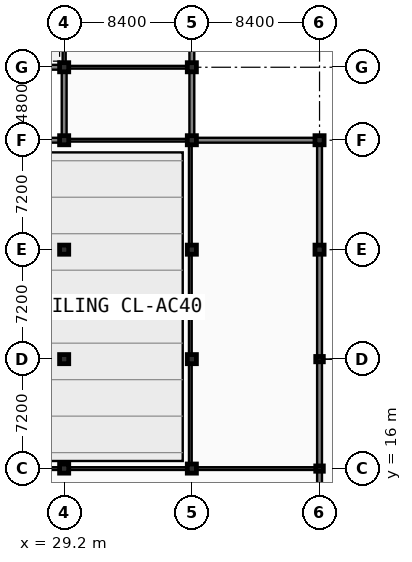
"""IFC4 building model, lengths in metres.
Left out: names, types, materials, properties, quantities, classifications, styles, units other than length and angle.
Written with IfcOpenShell. Run it as: python <this file> out.ifc"""

import sys

from ifc_helpers import new_model, si_unit, direction, frame, frame_2d, origin, origin_2d, place, context, subcontext, project, spatial, rectangle, extrude, element, fill, save


model = new_model("IFC4")
c1 = context("Model", 3, precision=1e-05, world=origin(), true_north=direction((0.0, 1.0)))
c2 = subcontext(c1, "Body", "Model", "MODEL_VIEW")
j1 = project(units=[si_unit("LENGTHUNIT", "METRE"), si_unit("PLANEANGLEUNIT", "RADIAN")], contexts=[c1])
p1 = place(None, origin())
s1 = spatial("IfcSite", under=j1, at=p1, CompositionType="ELEMENT")
p2 = place(p1, origin())
s2 = spatial("IfcBuilding", under=s1, at=p2, CompositionType="ELEMENT")
p3 = place(p2, origin())
s3 = spatial("IfcBuildingStorey", under=s2, at=p3, CompositionType="ELEMENT", Elevation=0.0)
for number, where, z_axis, x_axis in (
    (1, (29.2, 16.0, 0.0), (0.0, 0.0, 1.0), (1.0, 0.0, 0.0)),
    (2, (29.2, 23.2, 0.0), (0.0, 0.0, 1.0), (1.0, 0.0, 0.0)),
    (3, (29.2, 30.4, 0.0), (0.0, 0.0, 1.0), (1.0, 0.0, 0.0)),
    (4, (29.2, 37.6, 0.0), (0.0, 0.0, 1.0), (1.0, 0.0, 0.0)),
    (5, (29.2, 42.4, 0.0), (0.0, 0.0, 1.0), (1.0, 0.0, 0.0)),
    (6, (37.6, 16.0, 0.0), (0.0, 0.0, 1.0), (1.0, 0.0, 0.0)),
    (7, (37.6, 23.2, 0.0), (0.0, 0.0, 1.0), (1.0, 0.0, 0.0)),
    (8, (37.6, 30.4, 0.0), (0.0, 0.0, 1.0), (1.0, 0.0, 0.0)),
    (9, (37.6, 37.6, 0.0), (0.0, 0.0, 1.0), (1.0, 0.0, 0.0)),
    (10, (37.6, 42.4, 0.0), (0.0, 0.0, 1.0), (1.0, 0.0, 0.0)),
):
    element("IfcColumn", number, at=place(p3, frame(where, z_axis=z_axis, x_axis=x_axis)), inside=s3, PredefinedType="COLUMN", context=c2, shape_type="SweptSolid", body=[
        extrude(rectangle(XDim=0.6, YDim=0.6, at=origin_2d()), origin(), (0.0, 0.0, 1.0), 5.4),
    ])
for number, where, z_axis, x_axis in (
    (11, (46.0, 16.0, 0.0), (0.0, 0.0, 1.0), (1.0, 0.0, 0.0)),
    (12, (46.0, 23.2, 0.0), (0.0, 0.0, 1.0), (1.0, 0.0, 0.0)),
):
    element("IfcColumn", number, at=place(p3, frame(where, z_axis=z_axis, x_axis=x_axis)), inside=s3, PredefinedType="PILASTER", context=c2, shape_type="SweptSolid", body=[
        extrude(rectangle(XDim=0.5, YDim=0.35, at=origin_2d()), origin(), (0.0, 0.0, 1.0), 5.4),
    ])
for number, where, z_axis, x_axis in (
    (13, (46.0, 30.4, 0.0), (0.0, 0.0, 1.0), (1.0, 0.0, 0.0)),
    (14, (46.0, 37.6, 0.0), (0.0, 0.0, 1.0), (1.0, 0.0, 0.0)),
):
    element("IfcColumn", number, at=place(p3, frame(where, z_axis=z_axis, x_axis=x_axis)), inside=s3, PredefinedType="COLUMN", context=c2, shape_type="SweptSolid", body=[
        extrude(rectangle(XDim=0.6, YDim=0.6, at=origin_2d()), origin(), (0.0, 0.0, 1.0), 5.4),
    ])
p4 = place(p3, frame((12.4, 16.0, 0.0), z_axis=(0.0, 0.0, 1.0), x_axis=(1.0, 0.0, 0.0)))
e15 = element("IfcWall", 15, at=p4, inside=s3, PredefinedType="PARTITIONING", context=c2, shape_type="SweptSolid", body=[
    extrude(rectangle(XDim=33.45, YDim=0.18, at=frame_2d((16.725, 0.0))), origin(), (0.0, 0.0, 1.0), 3.99),
])
p5 = place(p4, frame((11.147, 0.0, -0.01)))
e16 = element("IfcOpeningElement", 16, at=p5, cuts=e15, PredefinedType="OPENING", context=c2, shape_type="SweptSolid", body=[
    extrude(rectangle(XDim=1.6, YDim=2.21, at=frame_2d((0.8, 1.105))), frame((0.0, 0.1, 0.0), z_axis=(0.0, -1.0, 0.0), x_axis=(1.0, 0.0, 0.0)), (0.0, 0.0, 1.0), 0.2),
])
p6 = place(p3, frame((37.5, 16.0, 0.0), z_axis=(0.0, 0.0, 1.0), x_axis=(0.0, 1.0, 0.0)))
e17 = element("IfcWall", 17, at=p6, inside=s3, PredefinedType="PARTITIONING", context=c2, shape_type="SweptSolid", body=[
    extrude(rectangle(XDim=21.75, YDim=0.18, at=frame_2d((10.875, 0.0))), origin(), (0.0, 0.0, 1.0), 4.54),
])
p7 = place(p6, frame((10.075, 0.0, -0.01)))
e18 = element("IfcOpeningElement", 18, at=p7, cuts=e17, PredefinedType="OPENING", context=c2, shape_type="SweptSolid", body=[
    extrude(rectangle(XDim=1.6, YDim=2.21, at=frame_2d((0.8, 1.105))), frame((0.0, 0.1, 0.0), z_axis=(0.0, -1.0, 0.0), x_axis=(1.0, 0.0, 0.0)), (0.0, 0.0, 1.0), 0.2),
])
p8 = place(p3, frame((29.35, 37.6, 0.0), z_axis=(0.0, 0.0, 1.0), x_axis=(1.0, 0.0, 0.0)))
e19 = element("IfcWall", 19, at=p8, inside=s3, PredefinedType="PARTITIONING", context=c2, shape_type="SweptSolid", body=[
    extrude(rectangle(XDim=8.1, YDim=0.18, at=frame_2d((4.05, 0.0))), origin(), (0.0, 0.0, 1.0), 4.64),
])
p9 = place(p8, frame((3.15, 0.0, -0.01)))
e20 = element("IfcOpeningElement", 20, at=p9, cuts=e19, PredefinedType="OPENING", context=c2, shape_type="SweptSolid", body=[
    extrude(rectangle(XDim=1.8, YDim=2.26, at=frame_2d((0.9, 1.13))), frame((0.0, 0.1, 0.0), z_axis=(0.0, -1.0, 0.0), x_axis=(1.0, 0.0, 0.0)), (0.0, 0.0, 1.0), 0.2),
])
p10 = place(p3, frame((29.35, 42.4, 0.0), z_axis=(0.0, 0.0, 1.0), x_axis=(1.0, 0.0, 0.0)))
e21 = element("IfcWall", 21, at=p10, inside=s3, PredefinedType="PARTITIONING", context=c2, shape_type="SweptSolid", body=[
    extrude(rectangle(XDim=8.1, YDim=0.18, at=frame_2d((4.05, 0.0))), origin(), (0.0, 0.0, 1.0), 4.64),
])
p11 = place(p10, frame((2.205, 0.0, -0.01)))
e22 = element("IfcOpeningElement", 22, at=p11, cuts=e21, PredefinedType="OPENING", context=c2, shape_type="SweptSolid", body=[
    extrude(rectangle(XDim=1.8, YDim=2.26, at=frame_2d((0.9, 1.13))), frame((0.0, 0.1, 0.0), z_axis=(0.0, -1.0, 0.0), x_axis=(1.0, 0.0, 0.0)), (0.0, 0.0, 1.0), 0.2),
])
p12 = place(p3, frame((29.2, 42.25, 0.0), z_axis=(0.0, 0.0, 1.0), x_axis=(0.0, 1.0, 0.0)))
e23 = element("IfcWall", 23, at=p12, inside=s3, PredefinedType="PARTITIONING", context=c2, shape_type="SweptSolid", body=[
    extrude(rectangle(XDim=33.6, YDim=0.2, at=frame_2d((16.8, 0.0))), origin(), (0.0, 0.0, 1.0), 4.54),
])
p13 = place(p12, frame((14.31, 0.0, -0.01)))
e24 = element("IfcOpeningElement", 24, at=p13, cuts=e23, PredefinedType="OPENING", context=c2, shape_type="SweptSolid", body=[
    extrude(rectangle(XDim=1.8, YDim=2.26, at=frame_2d((0.9, 1.13))), frame((0.0, 0.11, 0.0), z_axis=(0.0, -1.0, 0.0), x_axis=(1.0, 0.0, 0.0)), (0.0, 0.0, 1.0), 0.22),
])
p14 = place(p3, frame((29.2, 37.6, 0.0), z_axis=(0.0, 0.0, 1.0), x_axis=(-1.0, 0.0, 0.0)))
e25 = element("IfcWall", 25, at=p14, inside=s3, PredefinedType="SOLIDWALL", context=c2, shape_type="SweptSolid", body=[
    extrude(rectangle(XDim=8.4, YDim=0.32, at=frame_2d((4.2, 0.0))), origin(), (0.0, 0.0, 1.0), 4.64),
])
p15 = place(p14, frame((3.2, 0.0, -0.01)))
e26 = element("IfcOpeningElement", 26, at=p15, cuts=e25, PredefinedType="OPENING", context=c2, shape_type="SweptSolid", body=[
    extrude(rectangle(XDim=2.0, YDim=2.41, at=frame_2d((1.0, 1.205))), frame((0.0, 0.17, 0.0), z_axis=(0.0, -1.0, 0.0), x_axis=(1.0, 0.0, 0.0)), (0.0, 0.0, 1.0), 0.34),
])
p16 = place(p3, frame((46.0, 37.6, 0.0), z_axis=(0.0, 0.0, 1.0), x_axis=(-1.0, 0.0, 0.0)))
e27 = element("IfcWall", 27, at=p16, inside=s3, PredefinedType="SOLIDWALL", context=c2, shape_type="SweptSolid", body=[
    extrude(rectangle(XDim=8.4, YDim=0.32, at=frame_2d((4.2, 0.0))), origin(), (0.0, 0.0, 1.0), 4.64),
])
p17 = place(p16, frame((0.46, 0.0, 0.9)))
e28 = element("IfcOpeningElement", 28, at=p17, cuts=e27, PredefinedType="OPENING", context=c2, shape_type="SweptSolid", body=[
    extrude(rectangle(XDim=2.4, YDim=2.35, at=frame_2d((1.2, 1.175))), frame((0.0, 0.17, 0.0), z_axis=(0.0, -1.0, 0.0), x_axis=(1.0, 0.0, 0.0)), (0.0, 0.0, 1.0), 0.34),
])
p18 = place(p16, frame((5.46, 0.0, 0.9)))
e29 = element("IfcOpeningElement", 29, at=p18, cuts=e27, PredefinedType="OPENING", context=c2, shape_type="SweptSolid", body=[
    extrude(rectangle(XDim=2.4, YDim=2.35, at=frame_2d((1.2, 1.175))), frame((0.0, 0.17, 0.0), z_axis=(0.0, -1.0, 0.0), x_axis=(1.0, 0.0, 0.0)), (0.0, 0.0, 1.0), 0.34),
])
p19 = place(p3, frame((46.0, 8.8, 0.0), z_axis=(0.0, 0.0, 1.0), x_axis=(0.0, 1.0, 0.0)))
e30 = element("IfcWall", 30, at=p19, inside=s3, PredefinedType="SOLIDWALL", context=c2, shape_type="SweptSolid", body=[
    extrude(rectangle(XDim=7.2, YDim=0.32, at=frame_2d((3.6, 0.0))), origin(), (0.0, 0.0, 1.0), 3.99),
])
p20 = place(p19, frame((2.6, 0.0, -0.01)))
e31 = element("IfcOpeningElement", 31, at=p20, cuts=e30, PredefinedType="OPENING", context=c2, shape_type="SweptSolid", body=[
    extrude(rectangle(XDim=2.0, YDim=2.41, at=frame_2d((1.0, 1.205))), frame((0.0, 0.17, 0.0), z_axis=(0.0, -1.0, 0.0), x_axis=(1.0, 0.0, 0.0)), (0.0, 0.0, 1.0), 0.34),
])
p21 = place(p3, frame((46.0, 16.0, 0.0), z_axis=(0.0, 0.0, 1.0), x_axis=(0.0, 1.0, 0.0)))
e32 = element("IfcWall", 32, at=p21, inside=s3, PredefinedType="SOLIDWALL", context=c2, shape_type="SweptSolid", body=[
    extrude(rectangle(XDim=7.2, YDim=0.32, at=frame_2d((3.6, 0.0))), origin(), (0.0, 0.0, 1.0), 3.99),
])
p22 = place(p21, frame((0.46, 0.0, 0.9)))
e33 = element("IfcOpeningElement", 33, at=p22, cuts=e32, PredefinedType="OPENING", context=c2, shape_type="SweptSolid", body=[
    extrude(rectangle(XDim=1.8, YDim=2.2, at=frame_2d((0.9, 1.1))), frame((0.0, 0.17, 0.0), z_axis=(0.0, -1.0, 0.0), x_axis=(1.0, 0.0, 0.0)), (0.0, 0.0, 1.0), 0.34),
])
p23 = place(p21, frame((4.86, 0.0, 0.9)))
e34 = element("IfcOpeningElement", 34, at=p23, cuts=e32, PredefinedType="OPENING", context=c2, shape_type="SweptSolid", body=[
    extrude(rectangle(XDim=1.8, YDim=2.2, at=frame_2d((0.9, 1.1))), frame((0.0, 0.17, 0.0), z_axis=(0.0, -1.0, 0.0), x_axis=(1.0, 0.0, 0.0)), (0.0, 0.0, 1.0), 0.34),
])
p24 = place(p3, frame((46.0, 23.2, 0.0), z_axis=(0.0, 0.0, 1.0), x_axis=(0.0, 1.0, 0.0)))
e35 = element("IfcWall", 35, at=p24, inside=s3, PredefinedType="SOLIDWALL", context=c2, shape_type="SweptSolid", body=[
    extrude(rectangle(XDim=7.2, YDim=0.32, at=frame_2d((3.6, 0.0))), origin(), (0.0, 0.0, 1.0), 3.99),
])
p25 = place(p24, frame((0.46, 0.0, 0.9)))
e36 = element("IfcOpeningElement", 36, at=p25, cuts=e35, PredefinedType="OPENING", context=c2, shape_type="SweptSolid", body=[
    extrude(rectangle(XDim=1.8, YDim=2.2, at=frame_2d((0.9, 1.1))), frame((0.0, 0.17, 0.0), z_axis=(0.0, -1.0, 0.0), x_axis=(1.0, 0.0, 0.0)), (0.0, 0.0, 1.0), 0.34),
])
p26 = place(p24, frame((4.86, 0.0, 0.9)))
e37 = element("IfcOpeningElement", 37, at=p26, cuts=e35, PredefinedType="OPENING", context=c2, shape_type="SweptSolid", body=[
    extrude(rectangle(XDim=1.8, YDim=2.2, at=frame_2d((0.9, 1.1))), frame((0.0, 0.17, 0.0), z_axis=(0.0, -1.0, 0.0), x_axis=(1.0, 0.0, 0.0)), (0.0, 0.0, 1.0), 0.34),
])
p27 = place(p3, frame((46.0, 30.4, 0.0), z_axis=(0.0, 0.0, 1.0), x_axis=(0.0, 1.0, 0.0)))
e38 = element("IfcWall", 38, at=p27, inside=s3, PredefinedType="SOLIDWALL", context=c2, shape_type="SweptSolid", body=[
    extrude(rectangle(XDim=7.2, YDim=0.32, at=frame_2d((3.6, 0.0))), origin(), (0.0, 0.0, 1.0), 4.54),
])
p28 = place(p27, frame((0.46, 0.0, 0.9)))
e39 = element("IfcOpeningElement", 39, at=p28, cuts=e38, PredefinedType="OPENING", context=c2, shape_type="SweptSolid", body=[
    extrude(rectangle(XDim=1.8, YDim=2.2, at=frame_2d((0.9, 1.1))), frame((0.0, 0.17, 0.0), z_axis=(0.0, -1.0, 0.0), x_axis=(1.0, 0.0, 0.0)), (0.0, 0.0, 1.0), 0.34),
])
p29 = place(p27, frame((4.86, 0.0, 0.9)))
e40 = element("IfcOpeningElement", 40, at=p29, cuts=e38, PredefinedType="OPENING", context=c2, shape_type="SweptSolid", body=[
    extrude(rectangle(XDim=1.8, YDim=2.2, at=frame_2d((0.9, 1.1))), frame((0.0, 0.17, 0.0), z_axis=(0.0, -1.0, 0.0), x_axis=(1.0, 0.0, 0.0)), (0.0, 0.0, 1.0), 0.34),
])
p30 = place(p3, frame((20.8, 42.4, 0.0), z_axis=(0.0, 0.0, 1.0), x_axis=(1.0, 0.0, 0.0)))
e41 = element("IfcWall", 41, at=p30, inside=s3, PredefinedType="SOLIDWALL", context=c2, shape_type="SweptSolid", body=[
    extrude(rectangle(XDim=8.4, YDim=0.32, at=frame_2d((4.2, 0.0))), origin(), (0.0, 0.0, 1.0), 4.64),
])
p31 = place(p30, frame((0.46, 0.0, 0.9)))
e42 = element("IfcOpeningElement", 42, at=p31, cuts=e41, PredefinedType="OPENING", context=c2, shape_type="SweptSolid", body=[
    extrude(rectangle(XDim=2.4, YDim=2.35, at=frame_2d((1.2, 1.175))), frame((0.0, 0.17, 0.0), z_axis=(0.0, -1.0, 0.0), x_axis=(1.0, 0.0, 0.0)), (0.0, 0.0, 1.0), 0.34),
])
p32 = place(p30, frame((5.46, 0.0, 0.9)))
e43 = element("IfcOpeningElement", 43, at=p32, cuts=e41, PredefinedType="OPENING", context=c2, shape_type="SweptSolid", body=[
    extrude(rectangle(XDim=2.4, YDim=2.35, at=frame_2d((1.2, 1.175))), frame((0.0, 0.17, 0.0), z_axis=(0.0, -1.0, 0.0), x_axis=(1.0, 0.0, 0.0)), (0.0, 0.0, 1.0), 0.34),
])
p33 = place(p3, frame((37.6, 42.4, 0.0), z_axis=(0.0, 0.0, 1.0), x_axis=(0.0, 1.0, 0.0)))
e44 = element("IfcWall", 44, at=p33, inside=s3, PredefinedType="SOLIDWALL", context=c2, shape_type="SweptSolid", body=[
    extrude(rectangle(XDim=8.4, YDim=0.32, at=frame_2d((4.2, 0.0))), origin(), (0.0, 0.0, 1.0), 4.64),
])
p34 = place(p33, frame((0.46, 0.0, 0.9)))
e45 = element("IfcOpeningElement", 45, at=p34, cuts=e44, PredefinedType="OPENING", context=c2, shape_type="SweptSolid", body=[
    extrude(rectangle(XDim=2.4, YDim=2.35, at=frame_2d((1.2, 1.175))), frame((0.0, 0.17, 0.0), z_axis=(0.0, -1.0, 0.0), x_axis=(1.0, 0.0, 0.0)), (0.0, 0.0, 1.0), 0.34),
])
p35 = place(p33, frame((5.46, 0.0, 0.9)))
e46 = element("IfcOpeningElement", 46, at=p35, cuts=e44, PredefinedType="OPENING", context=c2, shape_type="SweptSolid", body=[
    extrude(rectangle(XDim=2.4, YDim=2.35, at=frame_2d((1.2, 1.175))), frame((0.0, 0.17, 0.0), z_axis=(0.0, -1.0, 0.0), x_axis=(1.0, 0.0, 0.0)), (0.0, 0.0, 1.0), 0.34),
])
p36 = place(p3, frame((29.2, 42.4, 0.0), z_axis=(0.0, 0.0, 1.0), x_axis=(0.0, -1.0, 0.0)))
e47 = element("IfcWall", 47, at=p36, inside=s3, PredefinedType="SOLIDWALL", context=c2, shape_type="SweptSolid", body=[
    extrude(rectangle(XDim=4.8, YDim=0.32, at=frame_2d((2.4, 0.0))), origin(), (0.0, 0.0, 1.0), 4.64),
])
p37 = place(p36, frame((1.46, 0.0, 0.9)))
e48 = element("IfcOpeningElement", 48, at=p37, cuts=e47, PredefinedType="OPENING", context=c2, shape_type="SweptSolid", body=[
    extrude(rectangle(XDim=1.8, YDim=2.2, at=frame_2d((0.9, 1.1))), frame((0.0, 0.17, 0.0), z_axis=(0.0, -1.0, 0.0), x_axis=(1.0, 0.0, 0.0)), (0.0, 0.0, 1.0), 0.34),
])
p38 = place(p3, frame((37.6, 37.6, 0.0), z_axis=(0.0, 0.0, 1.0), x_axis=(0.0, 1.0, 0.0)))
e49 = element("IfcWall", 49, at=p38, inside=s3, PredefinedType="SOLIDWALL", context=c2, shape_type="SweptSolid", body=[
    extrude(rectangle(XDim=4.8, YDim=0.32, at=frame_2d((2.4, 0.0))), origin(), (0.0, 0.0, 1.0), 4.64),
])
p39 = place(p38, frame((1.46, 0.0, 0.9)))
e50 = element("IfcOpeningElement", 50, at=p39, cuts=e49, PredefinedType="OPENING", context=c2, shape_type="SweptSolid", body=[
    extrude(rectangle(XDim=1.8, YDim=2.2, at=frame_2d((0.9, 1.1))), frame((0.0, 0.17, 0.0), z_axis=(0.0, -1.0, 0.0), x_axis=(1.0, 0.0, 0.0)), (0.0, 0.0, 1.0), 0.34),
])
p40 = place(p7, frame((0.0, 0.0, 0.01)))
e51 = element("IfcDoor", 51, at=p40, inside=s3, OperationType="DOUBLE_SWING_LEFT", PredefinedType="DOOR", context=c2, shape_type="SweptSolid", body=[
    extrude(rectangle(XDim=1.6, YDim=2.2, at=frame_2d((0.8, 1.1))), frame((0.0, 0.025, 0.0), z_axis=(0.0, -1.0, 0.0), x_axis=(1.0, 0.0, 0.0)), (0.0, 0.0, 1.0), 0.05),
])
fill(e18, e51)
p41 = place(p9, frame((1.8, 0.0, 0.01), z_axis=(0.0, 0.0, 1.0), x_axis=(-1.0, 0.0, 0.0)))
e52 = element("IfcDoor", 52, at=p41, inside=s3, OperationType="DOUBLE_SWING_LEFT", PredefinedType="DOOR", context=c2, shape_type="SweptSolid", body=[
    extrude(rectangle(XDim=1.8, YDim=2.25, at=frame_2d((0.9, 1.125))), frame((0.0, 0.025, 0.0), z_axis=(0.0, -1.0, 0.0), x_axis=(1.0, 0.0, 0.0)), (0.0, 0.0, 1.0), 0.05),
])
fill(e20, e52)
p42 = place(p11, frame((0.0, 0.0, 0.01)))
e53 = element("IfcDoor", 53, at=p42, inside=s3, OperationType="DOUBLE_SWING_LEFT", PredefinedType="DOOR", context=c2, shape_type="SweptSolid", body=[
    extrude(rectangle(XDim=1.8, YDim=2.25, at=frame_2d((0.9, 1.125))), frame((0.0, 0.025, 0.0), z_axis=(0.0, -1.0, 0.0), x_axis=(1.0, 0.0, 0.0)), (0.0, 0.0, 1.0), 0.05),
])
fill(e22, e53)
p43 = place(p17, origin())
e54 = element("IfcWindow", 54, at=p43, inside=s3, PartitioningType="TRIPLE_PANEL_VERTICAL", PredefinedType="WINDOW", context=c2, shape_type="SweptSolid", body=[
    extrude(rectangle(XDim=2.4, YDim=2.35, at=frame_2d((1.2, 1.175))), frame((0.0, 0.03, 0.0), z_axis=(0.0, -1.0, 0.0), x_axis=(1.0, 0.0, 0.0)), (0.0, 0.0, 1.0), 0.06),
])
fill(e28, e54)
p44 = place(p18, origin())
e55 = element("IfcWindow", 55, at=p44, inside=s3, PartitioningType="TRIPLE_PANEL_VERTICAL", PredefinedType="WINDOW", context=c2, shape_type="SweptSolid", body=[
    extrude(rectangle(XDim=2.4, YDim=2.35, at=frame_2d((1.2, 1.175))), frame((0.0, 0.03, 0.0), z_axis=(0.0, -1.0, 0.0), x_axis=(1.0, 0.0, 0.0)), (0.0, 0.0, 1.0), 0.06),
])
fill(e29, e55)
p45 = place(p22, origin())
e56 = element("IfcWindow", 56, at=p45, inside=s3, PartitioningType="DOUBLE_PANEL_VERTICAL", PredefinedType="WINDOW", context=c2, shape_type="SweptSolid", body=[
    extrude(rectangle(XDim=1.8, YDim=2.2, at=frame_2d((0.9, 1.1))), frame((0.0, 0.03, 0.0), z_axis=(0.0, -1.0, 0.0), x_axis=(1.0, 0.0, 0.0)), (0.0, 0.0, 1.0), 0.06),
])
fill(e33, e56)
p46 = place(p23, origin())
e57 = element("IfcWindow", 57, at=p46, inside=s3, PartitioningType="DOUBLE_PANEL_VERTICAL", PredefinedType="WINDOW", context=c2, shape_type="SweptSolid", body=[
    extrude(rectangle(XDim=1.8, YDim=2.2, at=frame_2d((0.9, 1.1))), frame((0.0, 0.03, 0.0), z_axis=(0.0, -1.0, 0.0), x_axis=(1.0, 0.0, 0.0)), (0.0, 0.0, 1.0), 0.06),
])
fill(e34, e57)
p47 = place(p25, origin())
e58 = element("IfcWindow", 58, at=p47, inside=s3, PartitioningType="DOUBLE_PANEL_VERTICAL", PredefinedType="WINDOW", context=c2, shape_type="SweptSolid", body=[
    extrude(rectangle(XDim=1.8, YDim=2.2, at=frame_2d((0.9, 1.1))), frame((0.0, 0.03, 0.0), z_axis=(0.0, -1.0, 0.0), x_axis=(1.0, 0.0, 0.0)), (0.0, 0.0, 1.0), 0.06),
])
fill(e36, e58)
p48 = place(p26, origin())
e59 = element("IfcWindow", 59, at=p48, inside=s3, PartitioningType="DOUBLE_PANEL_VERTICAL", PredefinedType="WINDOW", context=c2, shape_type="SweptSolid", body=[
    extrude(rectangle(XDim=1.8, YDim=2.2, at=frame_2d((0.9, 1.1))), frame((0.0, 0.03, 0.0), z_axis=(0.0, -1.0, 0.0), x_axis=(1.0, 0.0, 0.0)), (0.0, 0.0, 1.0), 0.06),
])
fill(e37, e59)
p49 = place(p28, origin())
e60 = element("IfcWindow", 60, at=p49, inside=s3, PartitioningType="DOUBLE_PANEL_VERTICAL", PredefinedType="WINDOW", context=c2, shape_type="SweptSolid", body=[
    extrude(rectangle(XDim=1.8, YDim=2.2, at=frame_2d((0.9, 1.1))), frame((0.0, 0.03, 0.0), z_axis=(0.0, -1.0, 0.0), x_axis=(1.0, 0.0, 0.0)), (0.0, 0.0, 1.0), 0.06),
])
fill(e39, e60)
p50 = place(p29, origin())
e61 = element("IfcWindow", 61, at=p50, inside=s3, PartitioningType="DOUBLE_PANEL_VERTICAL", PredefinedType="WINDOW", context=c2, shape_type="SweptSolid", body=[
    extrude(rectangle(XDim=1.8, YDim=2.2, at=frame_2d((0.9, 1.1))), frame((0.0, 0.03, 0.0), z_axis=(0.0, -1.0, 0.0), x_axis=(1.0, 0.0, 0.0)), (0.0, 0.0, 1.0), 0.06),
])
fill(e40, e61)
p51 = place(p32, origin())
e62 = element("IfcWindow", 62, at=p51, inside=s3, PartitioningType="TRIPLE_PANEL_VERTICAL", PredefinedType="WINDOW", context=c2, shape_type="SweptSolid", body=[
    extrude(rectangle(XDim=2.4, YDim=2.35, at=frame_2d((1.2, 1.175))), frame((0.0, 0.03, 0.0), z_axis=(0.0, -1.0, 0.0), x_axis=(1.0, 0.0, 0.0)), (0.0, 0.0, 1.0), 0.06),
])
fill(e43, e62)
p52 = place(p34, origin())
e63 = element("IfcWindow", 63, at=p52, inside=s3, PartitioningType="TRIPLE_PANEL_VERTICAL", PredefinedType="WINDOW", context=c2, shape_type="SweptSolid", body=[
    extrude(rectangle(XDim=2.4, YDim=2.35, at=frame_2d((1.2, 1.175))), frame((0.0, 0.03, 0.0), z_axis=(0.0, -1.0, 0.0), x_axis=(1.0, 0.0, 0.0)), (0.0, 0.0, 1.0), 0.06),
])
fill(e45, e63)
p53 = place(p37, origin())
e64 = element("IfcWindow", 64, at=p53, inside=s3, PartitioningType="DOUBLE_PANEL_VERTICAL", PredefinedType="WINDOW", context=c2, shape_type="SweptSolid", body=[
    extrude(rectangle(XDim=1.8, YDim=2.2, at=frame_2d((0.9, 1.1))), frame((0.0, 0.03, 0.0), z_axis=(0.0, -1.0, 0.0), x_axis=(1.0, 0.0, 0.0)), (0.0, 0.0, 1.0), 0.06),
])
fill(e48, e64)
p54 = place(p39, origin())
e65 = element("IfcWindow", 65, at=p54, inside=s3, PartitioningType="DOUBLE_PANEL_VERTICAL", PredefinedType="WINDOW", context=c2, shape_type="SweptSolid", body=[
    extrude(rectangle(XDim=1.8, YDim=2.2, at=frame_2d((0.9, 1.1))), frame((0.0, 0.03, 0.0), z_axis=(0.0, -1.0, 0.0), x_axis=(1.0, 0.0, 0.0)), (0.0, 0.0, 1.0), 0.06),
])
fill(e50, e65)
save(model, sys.argv[1])
